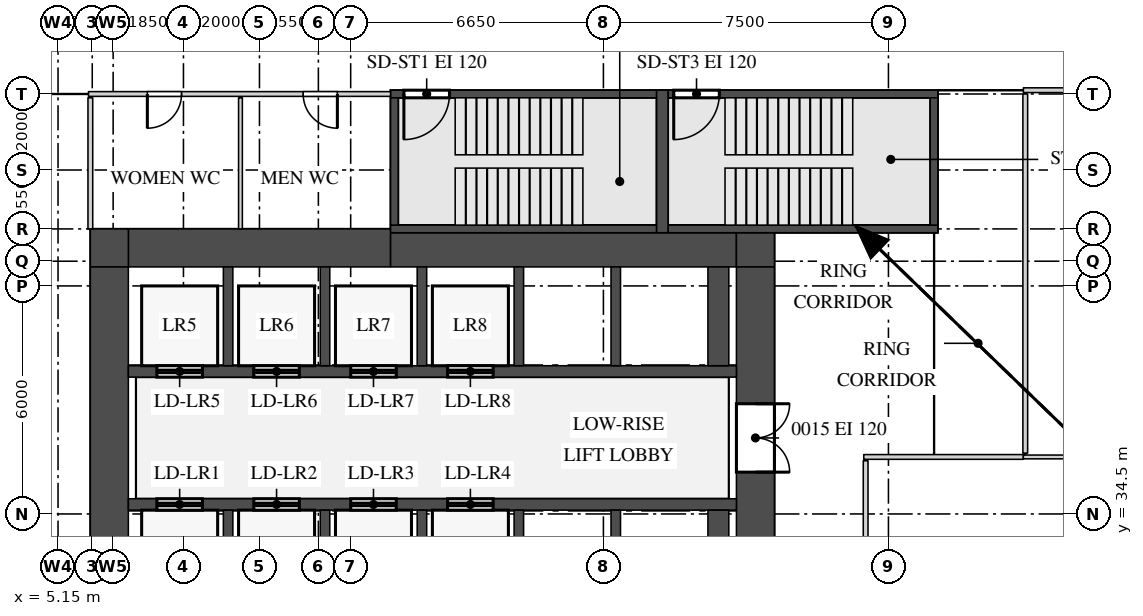
"""IFC4 building model, lengths in metres.
Left out: names, types, materials, properties, quantities, classifications, styles, units other than length and angle.
Written with IfcOpenShell. Run it as: python <this file> out.ifc"""

import sys

from ifc_helpers import new_model, si_unit, direction, frame, frame_2d, origin, place, context, subcontext, project, spatial, rectangle, extrude, source, transform, mapped, element, fill, save


model = new_model("IFC4")
c1 = context("Model", 3, precision=1e-05, world=origin(), true_north=direction((0.0, 1.0)))
c2 = subcontext(c1, "Body", "Model", "MODEL_VIEW")
j1 = project(units=[si_unit("LENGTHUNIT", "METRE"), si_unit("PLANEANGLEUNIT", "RADIAN")], contexts=[c1])
p1 = place(None, origin())
s1 = spatial("IfcSite", under=j1, at=p1, CompositionType="ELEMENT")
p2 = place(p1, origin())
s2 = spatial("IfcBuilding", under=s1, at=p2, CompositionType="ELEMENT")
p3 = place(p2, frame((0.0, 0.0, 114.7)))
s3 = spatial("IfcBuildingStorey", under=s2, at=p3, CompositionType="ELEMENT", Elevation=114.7)
m1 = source(origin(), c2, "Body", "SweptSolid", [
    extrude(rectangle(XDim=6.9, YDim=1.0, at=frame_2d((3.45, 0.0))), origin(), (0.0, 0.0, 1.0), 4.1),
])
p4 = place(p3, frame((7.0, 41.5, 0.0), z_axis=(0.0, 0.0, 1.0), x_axis=(1.0, 0.0, 0.0)))
e1 = element("IfcWall", 1, at=p4, inside=s3, PredefinedType="SHEAR", context=c2, shape_type="MappedRepresentation", body=[
    mapped(m1, transform((0.0, 0.0, 0.0))),
])
m2 = source(origin(), c2, "Body", "SweptSolid", [
    extrude(rectangle(XDim=9.1, YDim=0.9, at=frame_2d((4.55, 0.0))), origin(), (0.0, 0.0, 1.0), 4.1),
])
p5 = place(p3, frame((13.9, 41.45, 0.0), z_axis=(0.0, 0.0, 1.0), x_axis=(1.0, 0.0, 0.0)))
e2 = element("IfcWall", 2, at=p5, inside=s3, PredefinedType="SHEAR", context=c2, shape_type="MappedRepresentation", body=[
    mapped(m2, transform((0.0, 0.0, 0.0))),
])
m3 = source(origin(), c2, "Body", "SweptSolid", [
    extrude(rectangle(XDim=1.0, YDim=0.9, at=frame_2d((0.5, 0.0))), origin(), (0.0, 0.0, 1.0), 4.1),
])
p6 = place(p3, frame((23.0, 41.45, 0.0), z_axis=(0.0, 0.0, 1.0), x_axis=(1.0, 0.0, 0.0)))
e3 = element("IfcWall", 3, at=p6, inside=s3, PredefinedType="SHEAR", context=c2, shape_type="MappedRepresentation", body=[
    mapped(m3, transform((0.0, 0.0, 0.0))),
])
m4 = source(origin(), c2, "Body", "SweptSolid", [
    extrude(rectangle(XDim=1.0, YDim=1.0, at=frame_2d((0.5, 0.0))), origin(), (0.0, 0.0, 1.0), 4.1),
])
p7 = place(p3, frame((6.0, 41.5, 0.0), z_axis=(0.0, 0.0, 1.0), x_axis=(1.0, 0.0, 0.0)))
e4 = element("IfcWall", 4, at=p7, inside=s3, PredefinedType="SHEAR", context=c2, shape_type="MappedRepresentation", body=[
    mapped(m4, transform((0.0, 0.0, 0.0))),
])
m5 = source(origin(), c2, "Body", "SweptSolid", [
    extrude(rectangle(XDim=28.0, YDim=1.0, at=frame_2d((14.0, 0.0))), origin(), (0.0, 0.0, 1.0), 4.1),
])
p8 = place(p3, frame((23.5, 13.0, 0.0), z_axis=(0.0, 0.0, 1.0), x_axis=(0.0, 1.0, 0.0)))
e5 = element("IfcWall", 5, at=p8, inside=s3, PredefinedType="SHEAR", context=c2, shape_type="MappedRepresentation", body=[
    mapped(m5, transform((0.0, 0.0, 0.0))),
])
m6 = source(origin(), c2, "Body", "SweptSolid", [
    extrude(rectangle(XDim=1.8, YDim=2.1, at=frame_2d((0.9, 1.05))), frame((0.0, 0.51, 0.0), z_axis=(0.0, -1.0, 0.0), x_axis=(1.0, 0.0, 0.0)), (0.0, 0.0, 1.0), 1.02),
])
p9 = place(p8, frame((22.6, 0.0, 0.0)))
e6 = element("IfcOpeningElement", 6, at=p9, cuts=e5, PredefinedType="OPENING", context=c2, shape_type="MappedRepresentation", body=[
    mapped(m6, transform((0.0, 0.0, 0.0))),
])
m7 = source(origin(), c2, "Body", "SweptSolid", [
    extrude(rectangle(XDim=1.2, YDim=2.1, at=frame_2d((0.6, 1.05))), frame((0.0, 0.51, 0.0), z_axis=(0.0, -1.0, 0.0), x_axis=(1.0, 0.0, 0.0)), (0.0, 0.0, 1.0), 1.02),
])
p10 = place(p8, frame((13.85, 0.0, 0.0)))
e7 = element("IfcOpeningElement", 7, at=p10, cuts=e5, PredefinedType="OPENING", context=c2, shape_type="MappedRepresentation", body=[
    mapped(m7, transform((0.0, 0.0, 0.0))),
])
m8 = source(origin(), c2, "Body", "SweptSolid", [
    extrude(rectangle(XDim=0.9, YDim=2.1, at=frame_2d((0.45, 1.05))), frame((0.0, 0.51, 0.0), z_axis=(0.0, -1.0, 0.0), x_axis=(1.0, 0.0, 0.0)), (0.0, 0.0, 1.0), 1.02),
])
p11 = place(p8, frame((2.15, 0.0, 0.0)))
e8 = element("IfcOpeningElement", 8, at=p11, cuts=e5, PredefinedType="OPENING", context=c2, shape_type="MappedRepresentation", body=[
    mapped(m8, transform((0.0, 0.0, 0.0))),
])
p12 = place(p8, frame((7.0, 0.0, 0.0)))
e9 = element("IfcOpeningElement", 9, at=p12, cuts=e5, PredefinedType="OPENING", context=c2, shape_type="MappedRepresentation", body=[
    mapped(m8, transform((0.0, 0.0, 0.0))),
])
p13 = place(p3, frame((6.5, 13.0, 0.0), z_axis=(0.0, 0.0, 1.0), x_axis=(0.0, 1.0, 0.0)))
e10 = element("IfcWall", 10, at=p13, inside=s3, PredefinedType="SHEAR", context=c2, shape_type="MappedRepresentation", body=[
    mapped(m5, transform((0.0, 0.0, 0.0))),
])
m9 = source(origin(), c2, "Body", "SweptSolid", [
    extrude(rectangle(XDim=7.0, YDim=0.2, at=frame_2d((3.5, 0.0))), origin(), (0.0, 0.0, 1.0), 4.1),
])
p14 = place(p3, frame((13.9, 45.55, 0.0), z_axis=(0.0, 0.0, 1.0), x_axis=(1.0, 0.0, 0.0)))
e11 = element("IfcWall", 11, at=p14, inside=s3, PredefinedType="SHEAR", context=c2, shape_type="MappedRepresentation", body=[
    mapped(m9, transform((0.0, 0.0, 0.0))),
])
m10 = source(origin(), c2, "Body", "SweptSolid", [
    extrude(rectangle(XDim=1.2, YDim=2.1, at=frame_2d((0.6, 1.05))), frame((0.0, 0.11, 0.0), z_axis=(0.0, -1.0, 0.0), x_axis=(1.0, 0.0, 0.0)), (0.0, 0.0, 1.0), 0.22),
])
p15 = place(p14, frame((0.35, 0.0, 0.0)))
e12 = element("IfcOpeningElement", 12, at=p15, cuts=e11, PredefinedType="OPENING", context=c2, shape_type="MappedRepresentation", body=[
    mapped(m10, transform((0.0, 0.0, 0.0))),
])
p16 = place(p3, frame((13.9, 42.0, 0.0), z_axis=(0.0, 0.0, 1.0), x_axis=(1.0, 0.0, 0.0)))
e13 = element("IfcWall", 13, at=p16, inside=s3, PredefinedType="SHEAR", context=c2, shape_type="MappedRepresentation", body=[
    mapped(m9, transform((0.0, 0.0, 0.0))),
])
m11 = source(origin(), c2, "Body", "SweptSolid", [
    extrude(rectangle(XDim=7.1, YDim=0.2, at=frame_2d((3.55, 0.0))), origin(), (0.0, 0.0, 1.0), 4.1),
])
p17 = place(p3, frame((21.2, 45.55, 0.0), z_axis=(0.0, 0.0, 1.0), x_axis=(1.0, 0.0, 0.0)))
e14 = element("IfcWall", 14, at=p17, inside=s3, PredefinedType="SHEAR", context=c2, shape_type="MappedRepresentation", body=[
    mapped(m11, transform((0.0, 0.0, 0.0))),
])
p18 = place(p17, frame((0.15, 0.0, 0.0)))
e15 = element("IfcOpeningElement", 15, at=p18, cuts=e14, PredefinedType="OPENING", context=c2, shape_type="MappedRepresentation", body=[
    mapped(m10, transform((0.0, 0.0, 0.0))),
])
p19 = place(p3, frame((21.2, 42.0, 0.0), z_axis=(0.0, 0.0, 1.0), x_axis=(1.0, 0.0, 0.0)))
e16 = element("IfcWall", 16, at=p19, inside=s3, PredefinedType="SHEAR", context=c2, shape_type="MappedRepresentation", body=[
    mapped(m11, transform((0.0, 0.0, 0.0))),
])
m12 = source(origin(), c2, "Body", "SweptSolid", [
    extrude(rectangle(XDim=3.75, YDim=0.3, at=frame_2d((1.875, 0.0))), origin(), (0.0, 0.0, 1.0), 4.1),
])
p20 = place(p3, frame((21.05, 41.9, 0.0), z_axis=(0.0, 0.0, 1.0), x_axis=(0.0, 1.0, 0.0)))
e17 = element("IfcWall", 17, at=p20, inside=s3, PredefinedType="SHEAR", context=c2, shape_type="MappedRepresentation", body=[
    mapped(m12, transform((0.0, 0.0, 0.0))),
])
m13 = source(origin(), c2, "Body", "SweptSolid", [
    extrude(rectangle(XDim=3.35, YDim=0.2, at=frame_2d((1.675, 0.0))), origin(), (0.0, 0.0, 1.0), 4.1),
])
for number, where, z_axis, x_axis in (
    (18, (14.0, 42.1, 0.0), (0.0, 0.0, 1.0), (0.0, 1.0, 0.0)),
    (19, (28.2, 42.1, 0.0), (0.0, 0.0, 1.0), (0.0, 1.0, 0.0)),
):
    element("IfcWall", number, at=place(p3, frame(where, z_axis=z_axis, x_axis=x_axis)), inside=s3, PredefinedType="SHEAR", context=c2, shape_type="MappedRepresentation", body=[
        mapped(m13, transform((0.0, 0.0, 0.0))),
    ])
m14 = source(origin(), c2, "Body", "SweptSolid", [
    extrude(rectangle(XDim=16.0, YDim=0.3, at=frame_2d((8.0, 0.0))), origin(), (0.0, 0.0, 1.0), 4.1),
])
p21 = place(p3, frame((7.0, 38.25, 0.0), z_axis=(0.0, 0.0, 1.0), x_axis=(1.0, 0.0, 0.0)))
e20 = element("IfcWall", 20, at=p21, inside=s3, PredefinedType="STANDARD", context=c2, shape_type="MappedRepresentation", body=[
    mapped(m14, transform((0.0, 0.0, 0.0))),
])
m15 = source(origin(), c2, "Body", "SweptSolid", [
    extrude(rectangle(XDim=1.2, YDim=2.1, at=frame_2d((0.6, 1.05))), frame((0.0, 0.16, 0.0), z_axis=(0.0, -1.0, 0.0), x_axis=(1.0, 0.0, 0.0)), (0.0, 0.0, 1.0), 0.32),
])
p22 = place(p21, frame((0.75, 0.0, 0.0)))
e21 = element("IfcOpeningElement", 21, at=p22, cuts=e20, PredefinedType="OPENING", context=c2, shape_type="MappedRepresentation", body=[
    mapped(m15, transform((0.0, 0.0, 0.0))),
])
p23 = place(p21, frame((3.3, 0.0, 0.0)))
e22 = element("IfcOpeningElement", 22, at=p23, cuts=e20, PredefinedType="OPENING", context=c2, shape_type="MappedRepresentation", body=[
    mapped(m15, transform((0.0, 0.0, 0.0))),
])
p24 = place(p21, frame((5.85, 0.0, 0.0)))
e23 = element("IfcOpeningElement", 23, at=p24, cuts=e20, PredefinedType="OPENING", context=c2, shape_type="MappedRepresentation", body=[
    mapped(m15, transform((0.0, 0.0, 0.0))),
])
p25 = place(p21, frame((8.4, 0.0, 0.0)))
e24 = element("IfcOpeningElement", 24, at=p25, cuts=e20, PredefinedType="OPENING", context=c2, shape_type="MappedRepresentation", body=[
    mapped(m15, transform((0.0, 0.0, 0.0))),
])
p26 = place(p3, frame((7.0, 34.75, 0.0), z_axis=(0.0, 0.0, 1.0), x_axis=(1.0, 0.0, 0.0)))
e25 = element("IfcWall", 25, at=p26, inside=s3, PredefinedType="STANDARD", context=c2, shape_type="MappedRepresentation", body=[
    mapped(m14, transform((0.0, 0.0, 0.0))),
])
p27 = place(p26, frame((0.75, 0.0, 0.0)))
e26 = element("IfcOpeningElement", 26, at=p27, cuts=e25, PredefinedType="OPENING", context=c2, shape_type="MappedRepresentation", body=[
    mapped(m15, transform((0.0, 0.0, 0.0))),
])
p28 = place(p26, frame((3.3, 0.0, 0.0)))
e27 = element("IfcOpeningElement", 27, at=p28, cuts=e25, PredefinedType="OPENING", context=c2, shape_type="MappedRepresentation", body=[
    mapped(m15, transform((0.0, 0.0, 0.0))),
])
p29 = place(p26, frame((5.85, 0.0, 0.0)))
e28 = element("IfcOpeningElement", 28, at=p29, cuts=e25, PredefinedType="OPENING", context=c2, shape_type="MappedRepresentation", body=[
    mapped(m15, transform((0.0, 0.0, 0.0))),
])
p30 = place(p26, frame((8.4, 0.0, 0.0)))
e29 = element("IfcOpeningElement", 29, at=p30, cuts=e25, PredefinedType="OPENING", context=c2, shape_type="MappedRepresentation", body=[
    mapped(m15, transform((0.0, 0.0, 0.0))),
])
m16 = source(origin(), c2, "Body", "SweptSolid", [
    extrude(rectangle(XDim=2.6, YDim=0.25, at=frame_2d((1.3, 0.0))), origin(), (0.0, 0.0, 1.0), 4.1),
])
for number, where, z_axis, x_axis in (
    (30, (9.625, 38.4, 0.0), (0.0, 0.0, 1.0), (0.0, 1.0, 0.0)),
    (31, (12.175, 38.4, 0.0), (0.0, 0.0, 1.0), (0.0, 1.0, 0.0)),
    (32, (14.725, 38.4, 0.0), (0.0, 0.0, 1.0), (0.0, 1.0, 0.0)),
    (33, (17.275, 38.4, 0.0), (0.0, 0.0, 1.0), (0.0, 1.0, 0.0)),
    (34, (19.825, 38.4, 0.0), (0.0, 0.0, 1.0), (0.0, 1.0, 0.0)),
):
    element("IfcWall", number, at=place(p3, frame(where, z_axis=z_axis, x_axis=x_axis)), inside=s3, PredefinedType="STANDARD", context=c2, shape_type="MappedRepresentation", body=[
        mapped(m16, transform((0.0, 0.0, 0.0))),
    ])
m17 = source(origin(), c2, "Body", "SweptSolid", [
    extrude(rectangle(XDim=2.6, YDim=0.55, at=frame_2d((1.3, 0.0))), origin(), (0.0, 0.0, 1.0), 4.1),
])
p31 = place(p3, frame((22.525, 38.4, 0.0), z_axis=(0.0, 0.0, 1.0), x_axis=(0.0, 1.0, 0.0)))
e35 = element("IfcWall", 35, at=p31, inside=s3, PredefinedType="STANDARD", context=c2, shape_type="MappedRepresentation", body=[
    mapped(m17, transform((0.0, 0.0, 0.0))),
])
m18 = source(origin(), c2, "Body", "SweptSolid", [
    extrude(rectangle(XDim=2.4, YDim=0.25, at=frame_2d((1.2, 0.0))), origin(), (0.0, 0.0, 1.0), 4.1),
])
for number, where, z_axis, x_axis in (
    (36, (9.625, 32.2, 0.0), (0.0, 0.0, 1.0), (0.0, 1.0, 0.0)),
    (37, (12.175, 32.2, 0.0), (0.0, 0.0, 1.0), (0.0, 1.0, 0.0)),
    (38, (14.725, 32.2, 0.0), (0.0, 0.0, 1.0), (0.0, 1.0, 0.0)),
    (39, (17.275, 32.2, 0.0), (0.0, 0.0, 1.0), (0.0, 1.0, 0.0)),
    (40, (19.825, 32.2, 0.0), (0.0, 0.0, 1.0), (0.0, 1.0, 0.0)),
):
    element("IfcWall", number, at=place(p3, frame(where, z_axis=z_axis, x_axis=x_axis)), inside=s3, PredefinedType="STANDARD", context=c2, shape_type="MappedRepresentation", body=[
        mapped(m18, transform((0.0, 0.0, 0.0))),
    ])
m19 = source(origin(), c2, "Body", "SweptSolid", [
    extrude(rectangle(XDim=2.4, YDim=0.55, at=frame_2d((1.2, 0.0))), origin(), (0.0, 0.0, 1.0), 4.1),
])
p32 = place(p3, frame((22.525, 32.2, 0.0), z_axis=(0.0, 0.0, 1.0), x_axis=(0.0, 1.0, 0.0)))
e41 = element("IfcWall", 41, at=p32, inside=s3, PredefinedType="STANDARD", context=c2, shape_type="MappedRepresentation", body=[
    mapped(m19, transform((0.0, 0.0, 0.0))),
])
m20 = source(origin(), c2, "Body", "SweptSolid", [
    extrude(rectangle(XDim=23.2, YDim=0.125, at=frame_2d((11.6, 0.0))), origin(), (0.0, 0.0, 1.0), 4.2),
])
p33 = place(p3, frame((26.4, 12.7, 0.0), z_axis=(0.0, 0.0, 1.0), x_axis=(0.0, 1.0, 0.0)))
e42 = element("IfcWall", 42, at=p33, inside=s3, PredefinedType="PARTITIONING", context=c2, shape_type="MappedRepresentation", body=[
    mapped(m20, transform((0.0, 0.0, 0.0))),
])
m21 = source(origin(), c2, "Body", "SweptSolid", [
    extrude(rectangle(XDim=1.2, YDim=2.1, at=frame_2d((0.6, 1.05))), frame((0.0, 0.073, 0.0), z_axis=(0.0, -1.0, 0.0), x_axis=(1.0, 0.0, 0.0)), (0.0, 0.0, 1.0), 0.145),
])
p34 = place(p33, frame((6.65, 0.0, 0.0)))
e43 = element("IfcOpeningElement", 43, at=p34, cuts=e42, PredefinedType="OPENING", context=c2, shape_type="MappedRepresentation", body=[
    mapped(m21, transform((0.0, 0.0, 0.0))),
])
m22 = source(origin(), c2, "Body", "SweptSolid", [
    extrude(rectangle(XDim=4.2, YDim=0.125, at=frame_2d((2.1, 0.0))), origin(), (0.0, 0.0, 1.0), 4.2),
])
p35 = place(p3, frame((26.35, 36.0, 0.0), z_axis=(0.0, 0.0, 1.0), x_axis=(1.0, 0.0, 0.0)))
e44 = element("IfcWall", 44, at=p35, inside=s3, PredefinedType="PARTITIONING", context=c2, shape_type="MappedRepresentation", body=[
    mapped(m22, transform((0.0, 0.0, 0.0))),
])
m23 = source(origin(), c2, "Body", "SweptSolid", [
    extrude(rectangle(XDim=13.35, YDim=0.1, at=frame_2d((6.675, 0.0))), origin(), (0.0, 0.0, 1.0), 4.2),
])
p36 = place(p3, frame((30.55, 36.0, 0.0), z_axis=(0.0, 0.0, 1.0), x_axis=(1.0, 0.0, 0.0)))
e45 = element("IfcWall", 45, at=p36, inside=s3, PredefinedType="PARTITIONING", context=c2, shape_type="MappedRepresentation", body=[
    mapped(m23, transform((0.0, 0.0, 0.0))),
])
m24 = source(origin(), c2, "Body", "SweptSolid", [
    extrude(rectangle(XDim=9.45, YDim=0.125, at=frame_2d((4.725, 0.0))), origin(), (0.0, 0.0, 1.0), 4.2),
])
p37 = place(p3, frame((30.6, 36.1, 0.0), z_axis=(0.0, 0.0, 1.0), x_axis=(0.0, 1.0, 0.0)))
e46 = element("IfcWall", 46, at=p37, inside=s3, PredefinedType="PARTITIONING", context=c2, shape_type="MappedRepresentation", body=[
    mapped(m24, transform((0.0, 0.0, 0.0))),
])
m25 = source(origin(), c2, "Body", "SweptSolid", [
    extrude(rectangle(XDim=3.45, YDim=0.125, at=frame_2d((1.725, 0.0))), origin(), (0.0, 0.0, 1.0), 4.2),
])
p38 = place(p3, frame((6.0, 42.0, 0.0), z_axis=(0.0, 0.0, 1.0), x_axis=(0.0, 1.0, 0.0)))
e47 = element("IfcWall", 47, at=p38, inside=s3, PredefinedType="PARTITIONING", context=c2, shape_type="MappedRepresentation", body=[
    mapped(m25, transform((0.0, 0.0, 0.0))),
])
m26 = source(origin(), c2, "Body", "SweptSolid", [
    extrude(rectangle(XDim=3.45, YDim=0.1, at=frame_2d((1.725, 0.0))), origin(), (0.0, 0.0, 1.0), 4.2),
])
p39 = place(p3, frame((9.95, 42.0, 0.0), z_axis=(0.0, 0.0, 1.0), x_axis=(0.0, 1.0, 0.0)))
e48 = element("IfcWall", 48, at=p39, inside=s3, PredefinedType="PARTITIONING", context=c2, shape_type="MappedRepresentation", body=[
    mapped(m26, transform((0.0, 0.0, 0.0))),
])
m27 = source(origin(), c2, "Body", "SweptSolid", [
    extrude(rectangle(XDim=7.95, YDim=0.125, at=frame_2d((3.975, 0.0))), origin(), (0.0, 0.0, 1.0), 4.2),
])
p40 = place(p3, frame((5.95, 45.55, 0.0), z_axis=(0.0, 0.0, 1.0), x_axis=(1.0, 0.0, 0.0)))
e49 = element("IfcWall", 49, at=p40, inside=s3, PredefinedType="PARTITIONING", context=c2, shape_type="MappedRepresentation", body=[
    mapped(m27, transform((0.0, 0.0, 0.0))),
])
m28 = source(origin(), c2, "Body", "SweptSolid", [
    extrude(rectangle(XDim=0.9, YDim=2.1, at=frame_2d((0.45, 1.05))), frame((0.0, 0.073, 0.0), z_axis=(0.0, -1.0, 0.0), x_axis=(1.0, 0.0, 0.0)), (0.0, 0.0, 1.0), 0.145),
])
p41 = place(p40, frame((1.55, 0.0, 0.0)))
e50 = element("IfcOpeningElement", 50, at=p41, cuts=e49, PredefinedType="OPENING", context=c2, shape_type="MappedRepresentation", body=[
    mapped(m28, transform((0.0, 0.0, 0.0))),
])
p42 = place(p40, frame((5.65, 0.0, 0.0)))
e51 = element("IfcOpeningElement", 51, at=p42, cuts=e49, PredefinedType="OPENING", context=c2, shape_type="MappedRepresentation", body=[
    mapped(m28, transform((0.0, 0.0, 0.0))),
])
m29 = source(origin(), c2, "Body", "SweptSolid", [
    extrude(rectangle(XDim=13.5, YDim=0.125, at=frame_2d((6.75, 0.0))), origin(), (0.0, 0.0, 1.0), 4.2),
])
p43 = place(p3, frame((30.55, 45.65, 0.0), z_axis=(0.0, 0.0, 1.0), x_axis=(1.0, 0.0, 0.0)))
e52 = element("IfcWall", 52, at=p43, inside=s3, PredefinedType="PARTITIONING", context=c2, shape_type="MappedRepresentation", body=[
    mapped(m29, transform((0.0, 0.0, 0.0))),
])
m30 = source(origin(), c2, "Body", "SweptSolid", [
    extrude(rectangle(XDim=1.8, YDim=2.1, at=frame_2d((0.9, 1.05))), frame((0.0, 0.45, 0.0), z_axis=(0.0, -1.0, 0.0), x_axis=(1.0, 0.0, 0.0)), (0.0, 0.0, 1.0), 0.9),
])
p44 = place(p9, origin())
e53 = element("IfcDoor", 53, at=p44, inside=s3, OperationType="DOUBLE_DOOR_SINGLE_SWING", PredefinedType="DOOR", context=c2, shape_type="MappedRepresentation", body=[
    mapped(m30, transform((0.0, 0.0, 0.0))),
])
fill(e6, e53)
m31 = source(origin(), c2, "Body", "SweptSolid", [
    extrude(rectangle(XDim=0.9, YDim=2.1, at=frame_2d((0.45, 1.05))), frame((0.0, 0.025, 0.0), z_axis=(0.0, -1.0, 0.0), x_axis=(1.0, 0.0, 0.0)), (0.0, 0.0, 1.0), 0.05),
])
p45 = place(p41, origin())
e54 = element("IfcDoor", 54, at=p45, inside=s3, OperationType="SINGLE_SWING_LEFT", PredefinedType="DOOR", context=c2, shape_type="MappedRepresentation", body=[
    mapped(m31, transform((0.0, 0.0, 0.0))),
])
fill(e50, e54)
p46 = place(p42, origin())
e55 = element("IfcDoor", 55, at=p46, inside=s3, OperationType="SINGLE_SWING_RIGHT", PredefinedType="DOOR", context=c2, shape_type="MappedRepresentation", body=[
    mapped(m31, transform((0.0, 0.0, 0.0))),
])
fill(e51, e55)
m32 = source(origin(), c2, "Body", "SweptSolid", [
    extrude(rectangle(XDim=1.2, YDim=2.1, at=frame_2d((0.6, 1.05))), frame((0.0, 0.025, 0.0), z_axis=(0.0, -1.0, 0.0), x_axis=(1.0, 0.0, 0.0)), (0.0, 0.0, 1.0), 0.05),
])
p47 = place(p15, origin())
e56 = element("IfcDoor", 56, at=p47, inside=s3, OperationType="SINGLE_SWING_LEFT", PredefinedType="DOOR", context=c2, shape_type="MappedRepresentation", body=[
    mapped(m32, transform((0.0, 0.0, 0.0))),
])
fill(e12, e56)
p48 = place(p18, origin())
e57 = element("IfcDoor", 57, at=p48, inside=s3, OperationType="SINGLE_SWING_LEFT", PredefinedType="DOOR", context=c2, shape_type="MappedRepresentation", body=[
    mapped(m32, transform((0.0, 0.0, 0.0))),
])
fill(e15, e57)
p49 = place(p27, origin())
e58 = element("IfcDoor", 58, at=p49, inside=s3, OperationType="DOUBLE_DOOR_SLIDING", PredefinedType="DOOR", context=c2, shape_type="MappedRepresentation", body=[
    mapped(m32, transform((0.0, 0.0, 0.0))),
])
fill(e26, e58)
p50 = place(p28, origin())
e59 = element("IfcDoor", 59, at=p50, inside=s3, OperationType="DOUBLE_DOOR_SLIDING", PredefinedType="DOOR", context=c2, shape_type="MappedRepresentation", body=[
    mapped(m32, transform((0.0, 0.0, 0.0))),
])
fill(e27, e59)
p51 = place(p29, origin())
e60 = element("IfcDoor", 60, at=p51, inside=s3, OperationType="DOUBLE_DOOR_SLIDING", PredefinedType="DOOR", context=c2, shape_type="MappedRepresentation", body=[
    mapped(m32, transform((0.0, 0.0, 0.0))),
])
fill(e28, e60)
p52 = place(p30, origin())
e61 = element("IfcDoor", 61, at=p52, inside=s3, OperationType="DOUBLE_DOOR_SLIDING", PredefinedType="DOOR", context=c2, shape_type="MappedRepresentation", body=[
    mapped(m32, transform((0.0, 0.0, 0.0))),
])
fill(e29, e61)
p53 = place(p22, origin())
e62 = element("IfcDoor", 62, at=p53, inside=s3, OperationType="DOUBLE_DOOR_SLIDING", PredefinedType="DOOR", context=c2, shape_type="MappedRepresentation", body=[
    mapped(m32, transform((0.0, 0.0, 0.0))),
])
fill(e21, e62)
p54 = place(p23, origin())
e63 = element("IfcDoor", 63, at=p54, inside=s3, OperationType="DOUBLE_DOOR_SLIDING", PredefinedType="DOOR", context=c2, shape_type="MappedRepresentation", body=[
    mapped(m32, transform((0.0, 0.0, 0.0))),
])
fill(e22, e63)
p55 = place(p24, origin())
e64 = element("IfcDoor", 64, at=p55, inside=s3, OperationType="DOUBLE_DOOR_SLIDING", PredefinedType="DOOR", context=c2, shape_type="MappedRepresentation", body=[
    mapped(m32, transform((0.0, 0.0, 0.0))),
])
fill(e23, e64)
p56 = place(p25, origin())
e65 = element("IfcDoor", 65, at=p56, inside=s3, OperationType="DOUBLE_DOOR_SLIDING", PredefinedType="DOOR", context=c2, shape_type="MappedRepresentation", body=[
    mapped(m32, transform((0.0, 0.0, 0.0))),
])
fill(e24, e65)
save(model, sys.argv[1])
